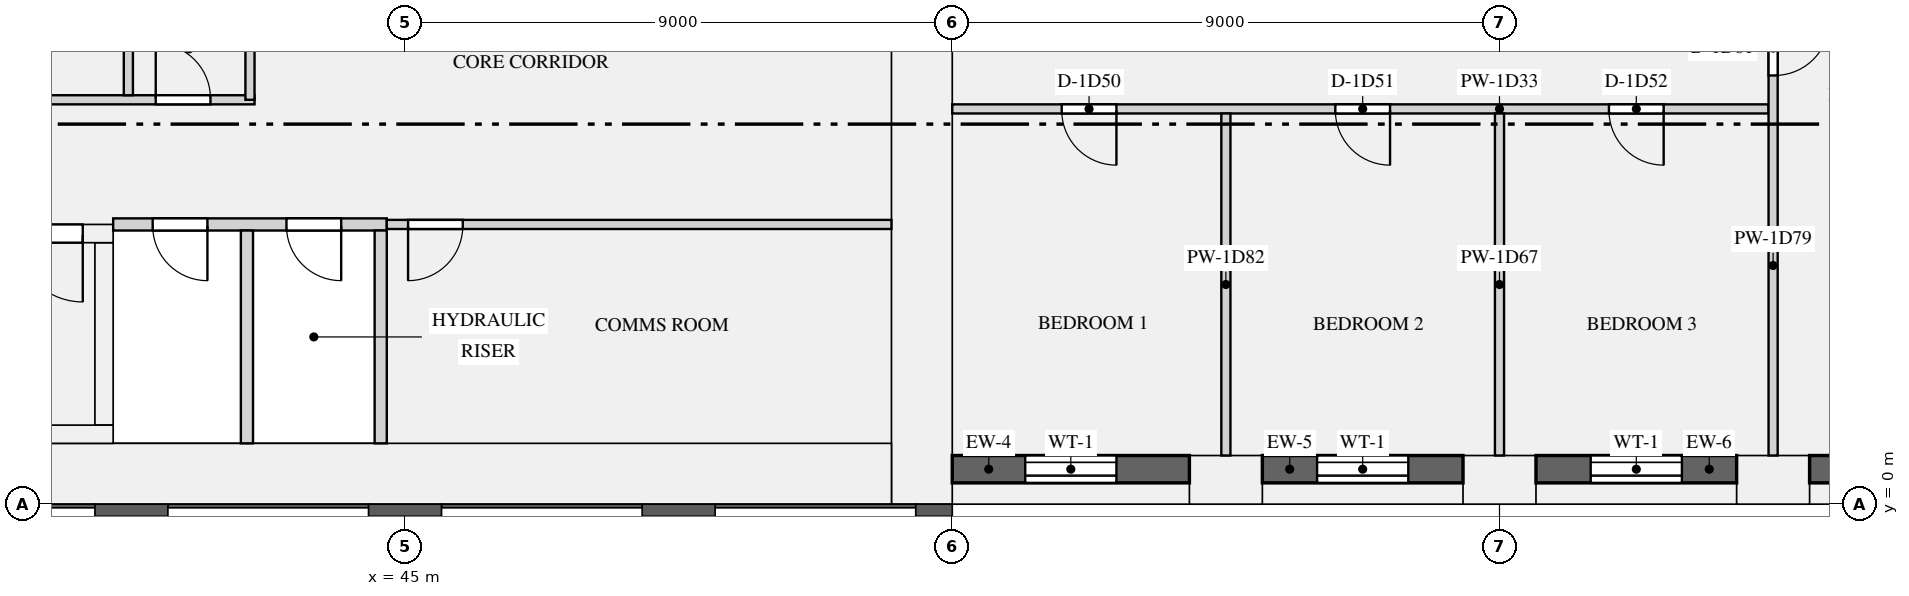
"""IFC4 building model, lengths in metres.
Left out: names, types, materials, properties, quantities, classifications, styles, units other than length and angle.
Written with IfcOpenShell. Run it as: python <this file> out.ifc"""

import sys

from ifc_helpers import new_model, si_unit, direction, frame, frame_2d, origin, origin_2d, place, context, subcontext, project, spatial, rectangle, extrude, element, fill, save


model = new_model("IFC4")
c1 = context("Model", 3, precision=1e-05, world=origin(), true_north=direction((0.0, 1.0)))
c2 = subcontext(c1, "Body", "Model", "MODEL_VIEW")
j1 = project(units=[si_unit("LENGTHUNIT", "METRE"), si_unit("PLANEANGLEUNIT", "RADIAN")], contexts=[c1])
p1 = place(None, origin())
s1 = spatial("IfcSite", under=j1, at=p1, CompositionType="ELEMENT")
p2 = place(p1, origin())
s2 = spatial("IfcBuilding", under=s1, at=p2, CompositionType="ELEMENT")
p3 = place(p2, frame((0.0, 0.0, 47.85)))
s3 = spatial("IfcBuildingStorey", under=s2, at=p3, CompositionType="ELEMENT", Elevation=47.85)
for number, where, z_axis, x_axis in (
    (1, (58.5, 0.4, 0.0), (0.0, 0.0, 1.0), (1.0, 0.0, 0.0)),
    (2, (63.0, 0.4, 0.0), (0.0, 0.0, 1.0), (1.0, 0.0, 0.0)),
    (3, (67.5, 0.4, 0.0), (0.0, 0.0, 1.0), (1.0, 0.0, 0.0)),
):
    element("IfcColumn", number, at=place(p3, frame(where, z_axis=z_axis, x_axis=x_axis)), inside=s3, PredefinedType="USERDEFINED", context=c2, shape_type="SweptSolid", body=[
        extrude(rectangle(XDim=1.2, YDim=0.8, at=origin_2d()), origin(), (0.0, 0.0, 1.0), 3.15),
    ])
p4 = place(p3, frame((53.5, 0.0, 0.0), z_axis=(0.0, 0.0, 1.0), x_axis=(0.0, 1.0, 0.0)))
e4 = element("IfcWall", 4, at=p4, inside=s3, PredefinedType="SHEAR", context=c2, shape_type="SweptSolid", body=[
    extrude(rectangle(XDim=12.5, YDim=1.0, at=frame_2d((6.25, 0.0))), origin(), (0.0, 0.0, 1.0), 3.15),
])
p5 = place(p3, frame((19.0, 0.5, 0.0), z_axis=(0.0, 0.0, 1.0), x_axis=(1.0, 0.0, 0.0)))
e5 = element("IfcWall", 5, at=p5, inside=s3, PredefinedType="SHEAR", context=c2, shape_type="SweptSolid", body=[
    extrude(rectangle(XDim=34.0, YDim=1.0, at=frame_2d((17.0, 0.0))), origin(), (0.0, 0.0, 1.0), 3.15),
])
p6 = place(p3, frame((31.8, 1.15, 0.0), z_axis=(0.0, 0.0, 1.0), x_axis=(1.0, 0.0, 0.0)))
e6 = element("IfcWall", 6, at=p6, inside=s3, PredefinedType="SHEAR", context=c2, shape_type="SweptSolid", body=[
    extrude(rectangle(XDim=8.4, YDim=0.3, at=frame_2d((4.2, 0.0))), origin(), (0.0, 0.0, 1.0), 3.15),
])
p7 = place(p3, frame((31.8, 4.45, 0.0), z_axis=(0.0, 0.0, 1.0), x_axis=(1.0, 0.0, 0.0)))
e7 = element("IfcWall", 7, at=p7, inside=s3, PredefinedType="SHEAR", context=c2, shape_type="SweptSolid", body=[
    extrude(rectangle(XDim=8.4, YDim=0.3, at=frame_2d((4.2, 0.0))), origin(), (0.0, 0.0, 1.0), 3.15),
])
p8 = place(p7, frame((6.8, 0.0, 0.0)))
e8 = element("IfcOpeningElement", 8, at=p8, cuts=e7, PredefinedType="OPENING", context=c2, shape_type="SweptSolid", body=[
    extrude(rectangle(XDim=1.1, YDim=2.1, at=frame_2d((0.55, 1.05))), frame((0.0, 0.16, 0.0), z_axis=(0.0, -1.0, 0.0), x_axis=(1.0, 0.0, 0.0)), (0.0, 0.0, 1.0), 0.32),
])
p9 = place(p3, frame((40.05, 1.3, 0.0), z_axis=(0.0, 0.0, 1.0), x_axis=(0.0, 1.0, 0.0)))
e9 = element("IfcWall", 9, at=p9, inside=s3, PredefinedType="SHEAR", context=c2, shape_type="SweptSolid", body=[
    extrude(rectangle(XDim=3.0, YDim=0.3, at=frame_2d((1.5, 0.0))), origin(), (0.0, 0.0, 1.0), 3.15),
])
p10 = place(p3, frame((54.0, 0.575, 0.9), z_axis=(0.0, 0.0, 1.0), x_axis=(1.0, 0.0, 0.0)))
e10 = element("IfcWall", 10, at=p10, inside=s3, PredefinedType="SOLIDWALL", context=c2, shape_type="SweptSolid", body=[
    extrude(rectangle(XDim=3.9, YDim=0.45, at=frame_2d((1.95, 0.0))), origin(), (0.0, 0.0, 1.0), 1.93),
])
p11 = place(p10, frame((1.2, 0.0, 0.15)))
e11 = element("IfcOpeningElement", 11, at=p11, cuts=e10, PredefinedType="OPENING", context=c2, shape_type="SweptSolid", body=[
    extrude(rectangle(XDim=1.5, YDim=1.5, at=frame_2d((0.75, 0.75))), frame((0.0, 0.235, 0.0), z_axis=(0.0, -1.0, 0.0), x_axis=(1.0, 0.0, 0.0)), (0.0, 0.0, 1.0), 0.47),
])
p12 = place(p3, frame((59.1, 0.575, 0.9), z_axis=(0.0, 0.0, 1.0), x_axis=(1.0, 0.0, 0.0)))
e12 = element("IfcWall", 12, at=p12, inside=s3, PredefinedType="SOLIDWALL", context=c2, shape_type="SweptSolid", body=[
    extrude(rectangle(XDim=3.3, YDim=0.45, at=frame_2d((1.65, 0.0))), origin(), (0.0, 0.0, 1.0), 1.93),
])
p13 = place(p12, frame((0.9, 0.0, 0.15)))
e13 = element("IfcOpeningElement", 13, at=p13, cuts=e12, PredefinedType="OPENING", context=c2, shape_type="SweptSolid", body=[
    extrude(rectangle(XDim=1.5, YDim=1.5, at=frame_2d((0.75, 0.75))), frame((0.0, 0.235, 0.0), z_axis=(0.0, -1.0, 0.0), x_axis=(1.0, 0.0, 0.0)), (0.0, 0.0, 1.0), 0.47),
])
p14 = place(p3, frame((63.6, 0.575, 0.9), z_axis=(0.0, 0.0, 1.0), x_axis=(1.0, 0.0, 0.0)))
e14 = element("IfcWall", 14, at=p14, inside=s3, PredefinedType="SOLIDWALL", context=c2, shape_type="SweptSolid", body=[
    extrude(rectangle(XDim=3.3, YDim=0.45, at=frame_2d((1.65, 0.0))), origin(), (0.0, 0.0, 1.0), 1.93),
])
p15 = place(p14, frame((0.9, 0.0, 0.15)))
e15 = element("IfcOpeningElement", 15, at=p15, cuts=e14, PredefinedType="OPENING", context=c2, shape_type="SweptSolid", body=[
    extrude(rectangle(XDim=1.5, YDim=1.5, at=frame_2d((0.75, 0.75))), frame((0.0, 0.235, 0.0), z_axis=(0.0, -1.0, 0.0), x_axis=(1.0, 0.0, 0.0)), (0.0, 0.0, 1.0), 0.47),
])
p16 = place(p3, frame((68.1, 0.575, 0.9), z_axis=(0.0, 0.0, 1.0), x_axis=(1.0, 0.0, 0.0)))
e16 = element("IfcWall", 16, at=p16, inside=s3, PredefinedType="SOLIDWALL", context=c2, shape_type="SweptSolid", body=[
    extrude(rectangle(XDim=3.1, YDim=0.45, at=frame_2d((1.55, 0.0))), origin(), (0.0, 0.0, 1.0), 1.93),
])
p17 = place(p16, frame((0.8, 0.0, 0.15)))
e17 = element("IfcOpeningElement", 17, at=p17, cuts=e16, PredefinedType="OPENING", context=c2, shape_type="SweptSolid", body=[
    extrude(rectangle(XDim=1.5, YDim=1.5, at=frame_2d((0.75, 0.75))), frame((0.0, 0.235, 0.0), z_axis=(0.0, -1.0, 0.0), x_axis=(1.0, 0.0, 0.0)), (0.0, 0.0, 1.0), 0.47),
])
p18 = place(p3, frame((40.2, 4.6, 0.0), z_axis=(0.0, 0.0, 1.0), x_axis=(1.0, 0.0, 0.0)))
e18 = element("IfcWall", 18, at=p18, inside=s3, PredefinedType="PARTITIONING", context=c2, shape_type="SweptSolid", body=[
    extrude(rectangle(XDim=4.5, YDim=0.2, at=frame_2d((2.25, 0.0))), origin(), (0.0, 0.0, 1.0), 2.83),
])
p19 = place(p18, frame((0.65, 0.0, 0.0)))
e19 = element("IfcOpeningElement", 19, at=p19, cuts=e18, PredefinedType="OPENING", context=c2, shape_type="SweptSolid", body=[
    extrude(rectangle(XDim=0.9, YDim=2.1, at=frame_2d((0.45, 1.05))), frame((0.0, 0.11, 0.0), z_axis=(0.0, -1.0, 0.0), x_axis=(1.0, 0.0, 0.0)), (0.0, 0.0, 1.0), 0.22),
])
p20 = place(p18, frame((2.85, 0.0, 0.0)))
e20 = element("IfcOpeningElement", 20, at=p20, cuts=e18, PredefinedType="OPENING", context=c2, shape_type="SweptSolid", body=[
    extrude(rectangle(XDim=0.9, YDim=2.1, at=frame_2d((0.45, 1.05))), frame((0.0, 0.11, 0.0), z_axis=(0.0, -1.0, 0.0), x_axis=(1.0, 0.0, 0.0)), (0.0, 0.0, 1.0), 0.22),
])
p21 = place(p3, frame((44.7, 4.6, 0.0), z_axis=(0.0, 0.0, 1.0), x_axis=(1.0, 0.0, 0.0)))
e21 = element("IfcWall", 21, at=p21, inside=s3, PredefinedType="PARTITIONING", context=c2, shape_type="SweptSolid", body=[
    extrude(rectangle(XDim=8.3, YDim=0.15, at=frame_2d((4.15, 0.0))), origin(), (0.0, 0.0, 1.0), 2.83),
])
p22 = place(p21, frame((0.35, 0.0, 0.0)))
e22 = element("IfcOpeningElement", 22, at=p22, cuts=e21, PredefinedType="OPENING", context=c2, shape_type="SweptSolid", body=[
    extrude(rectangle(XDim=0.9, YDim=2.1, at=frame_2d((0.45, 1.05))), frame((0.0, 0.085, 0.0), z_axis=(0.0, -1.0, 0.0), x_axis=(1.0, 0.0, 0.0)), (0.0, 0.0, 1.0), 0.17),
])
p23 = place(p3, frame((22.125, 6.65, 0.0), z_axis=(0.0, 0.0, 1.0), x_axis=(1.0, 0.0, 0.0)))
e23 = element("IfcWall", 23, at=p23, inside=s3, PredefinedType="PARTITIONING", context=c2, shape_type="SweptSolid", body=[
    extrude(rectangle(XDim=20.4, YDim=0.15, at=frame_2d((10.2, 0.0))), origin(), (0.0, 0.0, 1.0), 2.83),
])
p24 = place(p23, frame((0.525, 0.0, 0.0)))
e24 = element("IfcOpeningElement", 24, at=p24, cuts=e23, PredefinedType="OPENING", context=c2, shape_type="SweptSolid", body=[
    extrude(rectangle(XDim=0.9, YDim=2.1, at=frame_2d((0.45, 1.05))), frame((0.0, 0.085, 0.0), z_axis=(0.0, -1.0, 0.0), x_axis=(1.0, 0.0, 0.0)), (0.0, 0.0, 1.0), 0.17),
])
p25 = place(p23, frame((5.025, 0.0, 0.0)))
e25 = element("IfcOpeningElement", 25, at=p25, cuts=e23, PredefinedType="OPENING", context=c2, shape_type="SweptSolid", body=[
    extrude(rectangle(XDim=0.9, YDim=2.1, at=frame_2d((0.45, 1.05))), frame((0.0, 0.085, 0.0), z_axis=(0.0, -1.0, 0.0), x_axis=(1.0, 0.0, 0.0)), (0.0, 0.0, 1.0), 0.17),
])
p26 = place(p23, frame((10.525, 0.0, 0.0)))
e26 = element("IfcOpeningElement", 26, at=p26, cuts=e23, PredefinedType="OPENING", context=c2, shape_type="SweptSolid", body=[
    extrude(rectangle(XDim=0.9, YDim=2.1, at=frame_2d((0.45, 1.05))), frame((0.0, 0.085, 0.0), z_axis=(0.0, -1.0, 0.0), x_axis=(1.0, 0.0, 0.0)), (0.0, 0.0, 1.0), 0.17),
])
p27 = place(p23, frame((14.025, 0.0, 0.0)))
e27 = element("IfcOpeningElement", 27, at=p27, cuts=e23, PredefinedType="OPENING", context=c2, shape_type="SweptSolid", body=[
    extrude(rectangle(XDim=0.9, YDim=2.1, at=frame_2d((0.45, 1.05))), frame((0.0, 0.085, 0.0), z_axis=(0.0, -1.0, 0.0), x_axis=(1.0, 0.0, 0.0)), (0.0, 0.0, 1.0), 0.17),
])
p28 = place(p23, frame((18.775, 0.0, 0.0)))
e28 = element("IfcOpeningElement", 28, at=p28, cuts=e23, PredefinedType="OPENING", context=c2, shape_type="SweptSolid", body=[
    extrude(rectangle(XDim=0.9, YDim=2.1, at=frame_2d((0.45, 1.05))), frame((0.0, 0.085, 0.0), z_axis=(0.0, -1.0, 0.0), x_axis=(1.0, 0.0, 0.0)), (0.0, 0.0, 1.0), 0.17),
])
for number, where, z_axis, x_axis in (
    (29, (42.4, 1.0, 0.0), (0.0, 0.0, 1.0), (0.0, 1.0, 0.0)),
    (30, (44.6, 1.0, 0.0), (0.0, 0.0, 1.0), (0.0, 1.0, 0.0)),
):
    element("IfcWall", number, at=place(p3, frame(where, z_axis=z_axis, x_axis=x_axis)), inside=s3, PredefinedType="PARTITIONING", context=c2, shape_type="SweptSolid", body=[
        extrude(rectangle(XDim=3.5, YDim=0.2, at=frame_2d((1.75, 0.0))), origin(), (0.0, 0.0, 1.0), 2.83),
    ])
p29 = place(p3, frame((42.45, 6.65, 0.0), z_axis=(0.0, 0.0, 1.0), x_axis=(0.0, 1.0, 0.0)))
e31 = element("IfcWall", 31, at=p29, inside=s3, PredefinedType="PARTITIONING", context=c2, shape_type="SweptSolid", body=[
    extrude(rectangle(XDim=1.6, YDim=0.15, at=frame_2d((0.8, 0.0))), origin(), (0.0, 0.0, 1.0), 2.83),
])
p30 = place(p3, frame((40.45, 6.725, 0.0), z_axis=(0.0, 0.0, 1.0), x_axis=(0.0, 1.0, 0.0)))
e32 = element("IfcWall", 32, at=p30, inside=s3, PredefinedType="PARTITIONING", context=c2, shape_type="SweptSolid", body=[
    extrude(rectangle(XDim=2.625, YDim=0.15, at=frame_2d((1.312, 0.0))), origin(), (0.0, 0.0, 1.0), 2.83),
])
p31 = place(p3, frame((54.0, 6.5, 0.0), z_axis=(0.0, 0.0, 1.0), x_axis=(1.0, 0.0, 0.0)))
e33 = element("IfcWall", 33, at=p31, inside=s3, PredefinedType="PARTITIONING", context=c2, shape_type="SweptSolid", body=[
    extrude(rectangle(XDim=13.425, YDim=0.15, at=frame_2d((6.712, 0.0))), origin(), (0.0, 0.0, 1.0), 2.83),
])
p32 = place(p31, frame((1.8, 0.0, 0.0)))
e34 = element("IfcOpeningElement", 34, at=p32, cuts=e33, PredefinedType="OPENING", context=c2, shape_type="SweptSolid", body=[
    extrude(rectangle(XDim=0.9, YDim=2.1, at=frame_2d((0.45, 1.05))), frame((0.0, 0.085, 0.0), z_axis=(0.0, -1.0, 0.0), x_axis=(1.0, 0.0, 0.0)), (0.0, 0.0, 1.0), 0.17),
])
p33 = place(p31, frame((6.3, 0.0, 0.0)))
e35 = element("IfcOpeningElement", 35, at=p33, cuts=e33, PredefinedType="OPENING", context=c2, shape_type="SweptSolid", body=[
    extrude(rectangle(XDim=0.9, YDim=2.1, at=frame_2d((0.45, 1.05))), frame((0.0, 0.085, 0.0), z_axis=(0.0, -1.0, 0.0), x_axis=(1.0, 0.0, 0.0)), (0.0, 0.0, 1.0), 0.17),
])
p34 = place(p31, frame((10.8, 0.0, 0.0)))
e36 = element("IfcOpeningElement", 36, at=p34, cuts=e33, PredefinedType="OPENING", context=c2, shape_type="SweptSolid", body=[
    extrude(rectangle(XDim=0.9, YDim=2.1, at=frame_2d((0.45, 1.05))), frame((0.0, 0.085, 0.0), z_axis=(0.0, -1.0, 0.0), x_axis=(1.0, 0.0, 0.0)), (0.0, 0.0, 1.0), 0.17),
])
p35 = place(p3, frame((63.0, 0.8, 0.0), z_axis=(0.0, 0.0, 1.0), x_axis=(0.0, 1.0, 0.0)))
e37 = element("IfcWall", 37, at=p35, inside=s3, PredefinedType="PARTITIONING", context=c2, shape_type="SweptSolid", body=[
    extrude(rectangle(XDim=5.625, YDim=0.15, at=frame_2d((2.812, 0.0))), origin(), (0.0, 0.0, 1.0), 2.83),
])
p36 = place(p3, frame((67.5, 0.8, 0.0), z_axis=(0.0, 0.0, 1.0), x_axis=(0.0, 1.0, 0.0)))
e38 = element("IfcWall", 38, at=p36, inside=s3, PredefinedType="PARTITIONING", context=c2, shape_type="SweptSolid", body=[
    extrude(rectangle(XDim=11.625, YDim=0.15, at=frame_2d((5.812, 0.0))), origin(), (0.0, 0.0, 1.0), 2.83),
])
p37 = place(p36, frame((6.25, 0.0, 0.0)))
e39 = element("IfcOpeningElement", 39, at=p37, cuts=e38, PredefinedType="OPENING", context=c2, shape_type="SweptSolid", body=[
    extrude(rectangle(XDim=0.9, YDim=2.1, at=frame_2d((0.45, 1.05))), frame((0.0, 0.085, 0.0), z_axis=(0.0, -1.0, 0.0), x_axis=(1.0, 0.0, 0.0)), (0.0, 0.0, 1.0), 0.17),
])
p38 = place(p3, frame((58.5, 0.8, 0.0), z_axis=(0.0, 0.0, 1.0), x_axis=(0.0, 1.0, 0.0)))
e40 = element("IfcWall", 40, at=p38, inside=s3, PredefinedType="PARTITIONING", context=c2, shape_type="SweptSolid", body=[
    extrude(rectangle(XDim=5.625, YDim=0.15, at=frame_2d((2.812, 0.0))), origin(), (0.0, 0.0, 1.0), 2.83),
])
p39 = place(p11, origin())
e41 = element("IfcWindow", 41, at=p39, inside=s3, PartitioningType="SINGLE_PANEL", PredefinedType="WINDOW", context=c2, shape_type="SweptSolid", body=[
    extrude(rectangle(XDim=1.5, YDim=1.5, at=frame_2d((0.75, 0.75))), frame((0.0, -0.065, 0.0), z_axis=(0.0, -1.0, 0.0), x_axis=(1.0, 0.0, 0.0)), (0.0, 0.0, 1.0), 0.06),
])
fill(e11, e41)
p40 = place(p13, origin())
e42 = element("IfcWindow", 42, at=p40, inside=s3, PartitioningType="SINGLE_PANEL", PredefinedType="WINDOW", context=c2, shape_type="SweptSolid", body=[
    extrude(rectangle(XDim=1.5, YDim=1.5, at=frame_2d((0.75, 0.75))), frame((0.0, -0.065, 0.0), z_axis=(0.0, -1.0, 0.0), x_axis=(1.0, 0.0, 0.0)), (0.0, 0.0, 1.0), 0.06),
])
fill(e13, e42)
p41 = place(p15, origin())
e43 = element("IfcWindow", 43, at=p41, inside=s3, PartitioningType="SINGLE_PANEL", PredefinedType="WINDOW", context=c2, shape_type="SweptSolid", body=[
    extrude(rectangle(XDim=1.5, YDim=1.5, at=frame_2d((0.75, 0.75))), frame((0.0, -0.065, 0.0), z_axis=(0.0, -1.0, 0.0), x_axis=(1.0, 0.0, 0.0)), (0.0, 0.0, 1.0), 0.06),
])
fill(e15, e43)
p42 = place(p8, frame((1.1, 0.0, 0.0), z_axis=(0.0, 0.0, 1.0), x_axis=(-1.0, 0.0, 0.0)))
e44 = element("IfcDoor", 44, at=p42, inside=s3, OperationType="SINGLE_SWING_LEFT", PredefinedType="DOOR", context=c2, shape_type="SweptSolid", body=[
    extrude(rectangle(XDim=1.1, YDim=2.1, at=frame_2d((0.55, 1.05))), frame((0.0, 0.025, 0.0), z_axis=(0.0, -1.0, 0.0), x_axis=(1.0, 0.0, 0.0)), (0.0, 0.0, 1.0), 0.05),
])
fill(e8, e44)
p43 = place(p28, origin())
e45 = element("IfcDoor", 45, at=p43, inside=s3, OperationType="SINGLE_SWING_LEFT", PredefinedType="DOOR", context=c2, shape_type="SweptSolid", body=[
    extrude(rectangle(XDim=0.9, YDim=2.1, at=frame_2d((0.45, 1.05))), frame((0.0, 0.025, 0.0), z_axis=(0.0, -1.0, 0.0), x_axis=(1.0, 0.0, 0.0)), (0.0, 0.0, 1.0), 0.05),
])
fill(e28, e45)
p44 = place(p22, frame((0.9, 0.0, 0.0), z_axis=(0.0, 0.0, 1.0), x_axis=(-1.0, 0.0, 0.0)))
e46 = element("IfcDoor", 46, at=p44, inside=s3, OperationType="SINGLE_SWING_RIGHT", PredefinedType="DOOR", context=c2, shape_type="SweptSolid", body=[
    extrude(rectangle(XDim=0.9, YDim=2.1, at=frame_2d((0.45, 1.05))), frame((0.0, 0.025, 0.0), z_axis=(0.0, -1.0, 0.0), x_axis=(1.0, 0.0, 0.0)), (0.0, 0.0, 1.0), 0.05),
])
fill(e22, e46)
p45 = place(p19, frame((0.9, 0.0, 0.0), z_axis=(0.0, 0.0, 1.0), x_axis=(-1.0, 0.0, 0.0)))
e47 = element("IfcDoor", 47, at=p45, inside=s3, OperationType="SINGLE_SWING_LEFT", PredefinedType="DOOR", context=c2, shape_type="SweptSolid", body=[
    extrude(rectangle(XDim=0.9, YDim=2.1, at=frame_2d((0.45, 1.05))), frame((0.0, 0.025, 0.0), z_axis=(0.0, -1.0, 0.0), x_axis=(1.0, 0.0, 0.0)), (0.0, 0.0, 1.0), 0.05),
])
fill(e19, e47)
p46 = place(p20, frame((0.9, 0.0, 0.0), z_axis=(0.0, 0.0, 1.0), x_axis=(-1.0, 0.0, 0.0)))
e48 = element("IfcDoor", 48, at=p46, inside=s3, OperationType="SINGLE_SWING_LEFT", PredefinedType="DOOR", context=c2, shape_type="SweptSolid", body=[
    extrude(rectangle(XDim=0.9, YDim=2.1, at=frame_2d((0.45, 1.05))), frame((0.0, 0.025, 0.0), z_axis=(0.0, -1.0, 0.0), x_axis=(1.0, 0.0, 0.0)), (0.0, 0.0, 1.0), 0.05),
])
fill(e20, e48)
p47 = place(p32, frame((0.9, 0.0, 0.0), z_axis=(0.0, 0.0, 1.0), x_axis=(-1.0, 0.0, 0.0)))
e49 = element("IfcDoor", 49, at=p47, inside=s3, OperationType="SINGLE_SWING_LEFT", PredefinedType="DOOR", context=c2, shape_type="SweptSolid", body=[
    extrude(rectangle(XDim=0.9, YDim=2.1, at=frame_2d((0.45, 1.05))), frame((0.0, 0.025, 0.0), z_axis=(0.0, -1.0, 0.0), x_axis=(1.0, 0.0, 0.0)), (0.0, 0.0, 1.0), 0.05),
])
fill(e34, e49)
p48 = place(p33, frame((0.9, 0.0, 0.0), z_axis=(0.0, 0.0, 1.0), x_axis=(-1.0, 0.0, 0.0)))
e50 = element("IfcDoor", 50, at=p48, inside=s3, OperationType="SINGLE_SWING_LEFT", PredefinedType="DOOR", context=c2, shape_type="SweptSolid", body=[
    extrude(rectangle(XDim=0.9, YDim=2.1, at=frame_2d((0.45, 1.05))), frame((0.0, 0.025, 0.0), z_axis=(0.0, -1.0, 0.0), x_axis=(1.0, 0.0, 0.0)), (0.0, 0.0, 1.0), 0.05),
])
fill(e35, e50)
p49 = place(p34, frame((0.9, 0.0, 0.0), z_axis=(0.0, 0.0, 1.0), x_axis=(-1.0, 0.0, 0.0)))
e51 = element("IfcDoor", 51, at=p49, inside=s3, OperationType="SINGLE_SWING_LEFT", PredefinedType="DOOR", context=c2, shape_type="SweptSolid", body=[
    extrude(rectangle(XDim=0.9, YDim=2.1, at=frame_2d((0.45, 1.05))), frame((0.0, 0.025, 0.0), z_axis=(0.0, -1.0, 0.0), x_axis=(1.0, 0.0, 0.0)), (0.0, 0.0, 1.0), 0.05),
])
fill(e36, e51)
p50 = place(p37, frame((0.9, 0.0, 0.0), z_axis=(0.0, 0.0, 1.0), x_axis=(-1.0, 0.0, 0.0)))
e52 = element("IfcDoor", 52, at=p50, inside=s3, OperationType="SINGLE_SWING_LEFT", PredefinedType="DOOR", context=c2, shape_type="SweptSolid", body=[
    extrude(rectangle(XDim=0.9, YDim=2.1, at=frame_2d((0.45, 1.05))), frame((0.0, 0.025, 0.0), z_axis=(0.0, -1.0, 0.0), x_axis=(1.0, 0.0, 0.0)), (0.0, 0.0, 1.0), 0.05),
])
fill(e39, e52)
save(model, sys.argv[1])
